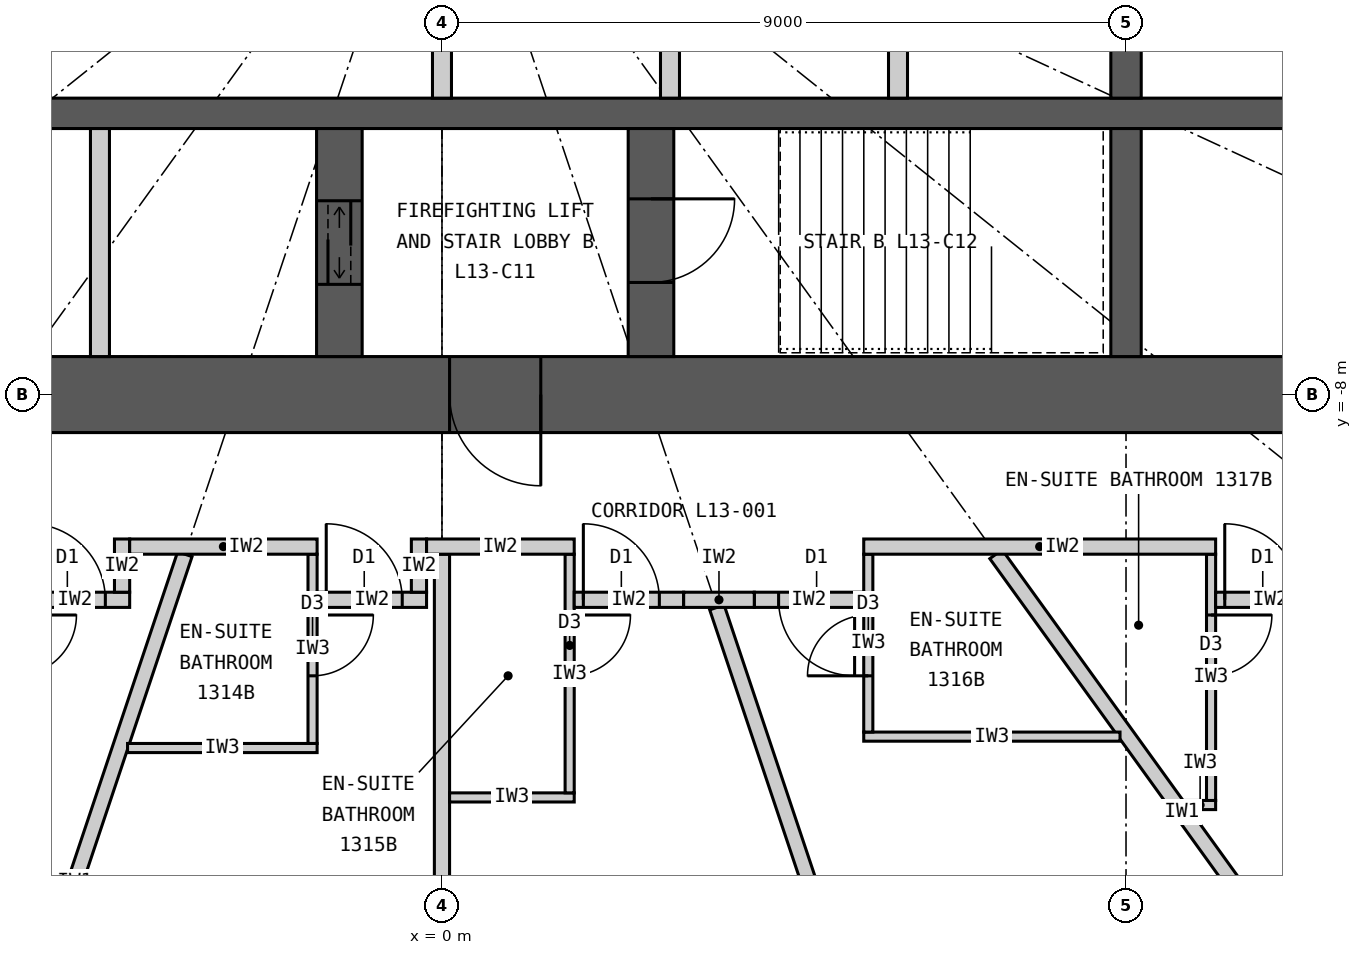
"""IFC4 building model, lengths in metres.
Left out: names, types, materials, properties, quantities, classifications, styles, units other than length and angle.
Written with IfcOpenShell. Run it as: python <this file> out.ifc"""

import sys

from ifc_helpers import new_model, si_unit, direction, frame, frame_2d, origin, place, context, subcontext, project, spatial, rectangle, extrude, element, fill, save


model = new_model("IFC4")
c1 = context("Model", 3, precision=1e-05, world=origin(), true_north=direction((0.0, 1.0)))
c2 = subcontext(c1, "Body", "Model", "MODEL_VIEW")
j1 = project(units=[si_unit("LENGTHUNIT", "METRE"), si_unit("PLANEANGLEUNIT", "RADIAN")], contexts=[c1])
p1 = place(None, origin())
s1 = spatial("IfcSite", under=j1, at=p1, CompositionType="ELEMENT")
p2 = place(p1, origin())
s2 = spatial("IfcBuilding", under=s1, at=p2, CompositionType="ELEMENT")
p3 = place(p2, frame((0.0, 0.0, 57.3)))
s3 = spatial("IfcBuildingStorey", under=s2, at=p3, CompositionType="ELEMENT", Elevation=57.3)
p4 = place(p3, frame((12.5, -8.0, 0.0), z_axis=(0.0, 0.0, 1.0), x_axis=(-1.0, 0.0, 0.0)))
e1 = element("IfcWall", 1, at=p4, inside=s3, PredefinedType="SHEAR", context=c2, shape_type="SweptSolid", body=[
    extrude(rectangle(XDim=25.0, YDim=1.0, at=frame_2d((12.5, 0.0))), origin(), (0.0, 0.0, 1.0), 3.3),
])
p5 = place(p4, frame((11.2, 0.0, 0.0)))
e2 = element("IfcOpeningElement", 2, at=p5, cuts=e1, PredefinedType="OPENING", context=c2, shape_type="SweptSolid", body=[
    extrude(rectangle(XDim=1.2, YDim=2.2, at=frame_2d((0.6, 1.1))), frame((0.0, 0.51, 0.0), z_axis=(0.0, -1.0, 0.0), x_axis=(1.0, 0.0, 0.0)), (0.0, 0.0, 1.0), 1.02),
])
p6 = place(p4, frame((18.8, 0.0, 0.0)))
e3 = element("IfcOpeningElement", 3, at=p6, cuts=e1, PredefinedType="OPENING", context=c2, shape_type="SweptSolid", body=[
    extrude(rectangle(XDim=0.9, YDim=2.2, at=frame_2d((0.45, 1.1))), frame((0.0, 0.51, 0.0), z_axis=(0.0, -1.0, 0.0), x_axis=(1.0, 0.0, 0.0)), (0.0, 0.0, 1.0), 1.02),
])
p7 = place(p3, frame((-11.5, -4.3, 0.0), z_axis=(0.0, 0.0, 1.0), x_axis=(1.0, 0.0, 0.0)))
e4 = element("IfcWall", 4, at=p7, inside=s3, PredefinedType="SHEAR", context=c2, shape_type="SweptSolid", body=[
    extrude(rectangle(XDim=23.0, YDim=0.4, at=frame_2d((11.5, 0.0))), origin(), (0.0, 0.0, 1.0), 3.3),
])
p8 = place(p3, frame((9.0, -4.1, 0.0), z_axis=(0.0, 0.0, 1.0), x_axis=(0.0, 1.0, 0.0)))
e5 = element("IfcWall", 5, at=p8, inside=s3, PredefinedType="SHEAR", context=c2, shape_type="SweptSolid", body=[
    extrude(rectangle(XDim=2.35, YDim=0.4, at=frame_2d((1.175, 0.0))), origin(), (0.0, 0.0, 1.0), 3.3),
])
p9 = place(p3, frame((9.0, -7.5, 0.0), z_axis=(0.0, 0.0, 1.0), x_axis=(0.0, 1.0, 0.0)))
e6 = element("IfcWall", 6, at=p9, inside=s3, PredefinedType="SHEAR", context=c2, shape_type="SweptSolid", body=[
    extrude(rectangle(XDim=3.0, YDim=0.4, at=frame_2d((1.5, 0.0))), origin(), (0.0, 0.0, 1.0), 3.3),
])
p10 = place(p3, frame((2.75, -7.5, 0.0), z_axis=(0.0, 0.0, 1.0), x_axis=(0.0, 1.0, 0.0)))
e7 = element("IfcWall", 7, at=p10, inside=s3, PredefinedType="SHEAR", context=c2, shape_type="SweptSolid", body=[
    extrude(rectangle(XDim=3.0, YDim=0.6, at=frame_2d((1.5, 0.0))), origin(), (0.0, 0.0, 1.0), 3.3),
])
p11 = place(p10, frame((0.975, 0.0, 0.0)))
e8 = element("IfcOpeningElement", 8, at=p11, cuts=e7, PredefinedType="OPENING", context=c2, shape_type="SweptSolid", body=[
    extrude(rectangle(XDim=1.1, YDim=2.2, at=frame_2d((0.55, 1.1))), frame((0.0, 0.31, 0.0), z_axis=(0.0, -1.0, 0.0), x_axis=(1.0, 0.0, 0.0)), (0.0, 0.0, 1.0), 0.62),
])
p12 = place(p3, frame((-1.35, -7.5, 0.0), z_axis=(0.0, 0.0, 1.0), x_axis=(0.0, 1.0, 0.0)))
e9 = element("IfcWall", 9, at=p12, inside=s3, PredefinedType="SHEAR", context=c2, shape_type="SweptSolid", body=[
    extrude(rectangle(XDim=3.0, YDim=0.6, at=frame_2d((1.5, 0.0))), origin(), (0.0, 0.0, 1.0), 3.3),
])
p13 = place(p12, frame((0.95, 0.0, 0.0)))
e10 = element("IfcOpeningElement", 10, at=p13, cuts=e9, PredefinedType="OPENING", context=c2, shape_type="SweptSolid", body=[
    extrude(rectangle(XDim=1.1, YDim=2.2, at=frame_2d((0.55, 1.1))), frame((0.0, 0.31, 0.0), z_axis=(0.0, -1.0, 0.0), x_axis=(1.0, 0.0, 0.0)), (0.0, 0.0, 1.0), 0.62),
])
p14 = place(p3, frame((-4.5, -7.5, 0.0), z_axis=(0.0, 0.0, 1.0), x_axis=(0.0, 1.0, 0.0)))
e11 = element("IfcWall", 11, at=p14, inside=s3, PredefinedType="PARTITIONING", context=c2, shape_type="SweptSolid", body=[
    extrude(rectangle(XDim=3.0, YDim=0.25, at=frame_2d((1.5, 0.0))), origin(), (0.0, 0.0, 1.0), 3.3),
])
for number, where, z_axis, x_axis in (
    (12, (0.0, -4.1, 0.0), (0.0, 0.0, 1.0), (0.0, 1.0, 0.0)),
    (13, (3.0, -4.1, 0.0), (0.0, 0.0, 1.0), (0.0, 1.0, 0.0)),
    (14, (6.0, -4.1, 0.0), (0.0, 0.0, 1.0), (0.0, 1.0, 0.0)),
):
    element("IfcWall", number, at=place(p3, frame(where, z_axis=z_axis, x_axis=x_axis)), inside=s3, PredefinedType="PARTITIONING", context=c2, shape_type="SweptSolid", body=[
        extrude(rectangle(XDim=2.35, YDim=0.25, at=frame_2d((1.175, 0.0))), origin(), (0.0, 0.0, 1.0), 3.3),
    ])
p15 = place(p3, frame((-3.383, -10.1, 0.0), z_axis=(0.0, 0.0, 1.0), x_axis=(-0.31759592231, -0.948226149256, 0.0)))
e15 = element("IfcWall", 15, at=p15, inside=s3, PredefinedType="PARTITIONING", context=c2, shape_type="SweptSolid", body=[
    extrude(rectangle(XDim=9.098, YDim=0.2, at=frame_2d((4.549, 0.0))), origin(), (0.0, 0.0, 1.0), 2.32),
])
p16 = place(p3, frame((0.0, -10.1, 0.0), z_axis=(0.0, 0.0, 1.0), x_axis=(0.0, -1.0, 0.0)))
e16 = element("IfcWall", 16, at=p16, inside=s3, PredefinedType="PARTITIONING", context=c2, shape_type="SweptSolid", body=[
    extrude(rectangle(XDim=9.25, YDim=0.2, at=frame_2d((4.625, 0.0))), origin(), (0.0, 0.0, 1.0), 2.32),
])
p17 = place(p3, frame((3.617, -10.8, 0.0), z_axis=(0.0, 0.0, 1.0), x_axis=(0.317576599239, -0.948232621046, 0.0)))
e17 = element("IfcWall", 17, at=p17, inside=s3, PredefinedType="PARTITIONING", context=c2, shape_type="SweptSolid", body=[
    extrude(rectangle(XDim=8.36, YDim=0.2, at=frame_2d((4.18, 0.0))), origin(), (0.0, 0.0, 1.0), 2.32),
])
p18 = place(p3, frame((7.289, -10.1, 0.0), z_axis=(0.0, 0.0, 1.0), x_axis=(0.585198353053, -0.810890182197, 0.0)))
e18 = element("IfcWall", 18, at=p18, inside=s3, PredefinedType="PARTITIONING", context=c2, shape_type="SweptSolid", body=[
    extrude(rectangle(XDim=8.36, YDim=0.2, at=frame_2d((4.18, 0.0))), origin(), (0.0, 0.0, 1.0), 2.32),
])
p19 = place(p3, frame((-4.137, -12.65, 0.0), z_axis=(0.0, 0.0, 1.0), x_axis=(1.0, 0.0, 0.0)))
e19 = element("IfcWall", 19, at=p19, inside=s3, PredefinedType="PARTITIONING", context=c2, shape_type="SweptSolid", body=[
    extrude(rectangle(XDim=2.494, YDim=0.12, at=frame_2d((1.247, 0.0))), origin(), (0.0, 0.0, 1.0), 3.12),
])
p20 = place(p3, frame((-1.703, -10.1, 0.0), z_axis=(0.0, 0.0, 1.0), x_axis=(0.0, -1.0, 0.0)))
e20 = element("IfcWall", 20, at=p20, inside=s3, PredefinedType="PARTITIONING", context=c2, shape_type="SweptSolid", body=[
    extrude(rectangle(XDim=2.49, YDim=0.12, at=frame_2d((1.245, 0.0))), origin(), (0.0, 0.0, 1.0), 3.12),
])
p21 = place(p20, frame((0.8, 0.0, 0.0)))
e21 = element("IfcOpeningElement", 21, at=p21, cuts=e20, PredefinedType="OPENING", context=c2, shape_type="SweptSolid", body=[
    extrude(rectangle(XDim=0.8, YDim=2.1, at=frame_2d((0.4, 1.05))), frame((0.0, 0.07, 0.0), z_axis=(0.0, -1.0, 0.0), x_axis=(1.0, 0.0, 0.0)), (0.0, 0.0, 1.0), 0.14),
])
p22 = place(p3, frame((0.1, -13.3, 0.0), z_axis=(0.0, 0.0, 1.0), x_axis=(1.0, 0.0, 0.0)))
e22 = element("IfcWall", 22, at=p22, inside=s3, PredefinedType="PARTITIONING", context=c2, shape_type="SweptSolid", body=[
    extrude(rectangle(XDim=1.64, YDim=0.12, at=frame_2d((0.82, 0.0))), origin(), (0.0, 0.0, 1.0), 3.12),
])
p23 = place(p3, frame((1.68, -10.1, 0.0), z_axis=(0.0, 0.0, 1.0), x_axis=(0.0, -1.0, 0.0)))
e23 = element("IfcWall", 23, at=p23, inside=s3, PredefinedType="PARTITIONING", context=c2, shape_type="SweptSolid", body=[
    extrude(rectangle(XDim=3.14, YDim=0.12, at=frame_2d((1.57, 0.0))), origin(), (0.0, 0.0, 1.0), 3.12),
])
p24 = place(p23, frame((0.8, 0.0, 0.0)))
e24 = element("IfcOpeningElement", 24, at=p24, cuts=e23, PredefinedType="OPENING", context=c2, shape_type="SweptSolid", body=[
    extrude(rectangle(XDim=0.8, YDim=2.1, at=frame_2d((0.4, 1.05))), frame((0.0, 0.07, 0.0), z_axis=(0.0, -1.0, 0.0), x_axis=(1.0, 0.0, 0.0)), (0.0, 0.0, 1.0), 0.14),
])
p25 = place(p3, frame((8.921, -12.5, 0.0), z_axis=(0.0, 0.0, 1.0), x_axis=(-1.0, 0.0, 0.0)))
e25 = element("IfcWall", 25, at=p25, inside=s3, PredefinedType="PARTITIONING", context=c2, shape_type="SweptSolid", body=[
    extrude(rectangle(XDim=3.372, YDim=0.12, at=frame_2d((1.686, 0.0))), origin(), (0.0, 0.0, 1.0), 3.12),
])
p26 = place(p3, frame((5.609, -10.1, 0.0), z_axis=(0.0, 0.0, 1.0), x_axis=(0.0, -1.0, 0.0)))
e26 = element("IfcWall", 26, at=p26, inside=s3, PredefinedType="PARTITIONING", context=c2, shape_type="SweptSolid", body=[
    extrude(rectangle(XDim=2.34, YDim=0.12, at=frame_2d((1.17, 0.0))), origin(), (0.0, 0.0, 1.0), 3.12),
])
p27 = place(p26, frame((0.8, 0.0, 0.0)))
e27 = element("IfcOpeningElement", 27, at=p27, cuts=e26, PredefinedType="OPENING", context=c2, shape_type="SweptSolid", body=[
    extrude(rectangle(XDim=0.8, YDim=2.1, at=frame_2d((0.4, 1.05))), frame((0.0, 0.07, 0.0), z_axis=(0.0, -1.0, 0.0), x_axis=(1.0, 0.0, 0.0)), (0.0, 0.0, 1.0), 0.14),
])
p28 = place(p3, frame((9.771, -13.4, 0.0), z_axis=(0.0, 0.0, 1.0), x_axis=(1.0, 0.0, 0.0)))
e28 = element("IfcWall", 28, at=p28, inside=s3, PredefinedType="PARTITIONING", context=c2, shape_type="SweptSolid", body=[
    extrude(rectangle(XDim=0.408, YDim=0.12, at=frame_2d((0.204, 0.0))), origin(), (0.0, 0.0, 1.0), 3.12),
])
p29 = place(p3, frame((10.119, -10.1, 0.0), z_axis=(0.0, 0.0, 1.0), x_axis=(0.0, -1.0, 0.0)))
e29 = element("IfcWall", 29, at=p29, inside=s3, PredefinedType="PARTITIONING", context=c2, shape_type="SweptSolid", body=[
    extrude(rectangle(XDim=3.24, YDim=0.12, at=frame_2d((1.62, 0.0))), origin(), (0.0, 0.0, 1.0), 3.12),
])
p30 = place(p29, frame((0.8, 0.0, 0.0)))
e30 = element("IfcOpeningElement", 30, at=p30, cuts=e29, PredefinedType="OPENING", context=c2, shape_type="SweptSolid", body=[
    extrude(rectangle(XDim=0.8, YDim=2.1, at=frame_2d((0.4, 1.05))), frame((0.0, 0.07, 0.0), z_axis=(0.0, -1.0, 0.0), x_axis=(1.0, 0.0, 0.0)), (0.0, 0.0, 1.0), 0.14),
])
p31 = place(p3, frame((-4.109, -10.7, 0.0), z_axis=(0.0, 0.0, 1.0), x_axis=(-1.0, 0.0, 0.0)))
e31 = element("IfcWall", 31, at=p31, inside=s3, PredefinedType="PARTITIONING", context=c2, shape_type="SweptSolid", body=[
    extrude(rectangle(XDim=1.44, YDim=0.2, at=frame_2d((0.72, 0.0))), origin(), (0.0, 0.0, 1.0), 3.12),
])
p32 = place(p31, frame((0.32, 0.0, 0.0)))
e32 = element("IfcOpeningElement", 32, at=p32, cuts=e31, PredefinedType="OPENING", context=c2, shape_type="SweptSolid", body=[
    extrude(rectangle(XDim=1.0, YDim=2.2, at=frame_2d((0.5, 1.1))), frame((0.0, 0.11, 0.0), z_axis=(0.0, -1.0, 0.0), x_axis=(1.0, 0.0, 0.0)), (0.0, 0.0, 1.0), 0.22),
])
p33 = place(p3, frame((-4.209, -9.9, 0.0), z_axis=(0.0, 0.0, 1.0), x_axis=(0.0, -1.0, 0.0)))
e33 = element("IfcWall", 33, at=p33, inside=s3, PredefinedType="PARTITIONING", context=c2, shape_type="SweptSolid", body=[
    extrude(rectangle(XDim=0.7, YDim=0.2, at=frame_2d((0.35, 0.0))), origin(), (0.0, 0.0, 1.0), 3.12),
])
p34 = place(p3, frame((-0.203, -10.7, 0.0), z_axis=(0.0, 0.0, 1.0), x_axis=(-1.0, 0.0, 0.0)))
e34 = element("IfcWall", 34, at=p34, inside=s3, PredefinedType="PARTITIONING", context=c2, shape_type="SweptSolid", body=[
    extrude(rectangle(XDim=1.44, YDim=0.2, at=frame_2d((0.72, 0.0))), origin(), (0.0, 0.0, 1.0), 3.12),
])
p35 = place(p34, frame((0.32, 0.0, 0.0)))
e35 = element("IfcOpeningElement", 35, at=p35, cuts=e34, PredefinedType="OPENING", context=c2, shape_type="SweptSolid", body=[
    extrude(rectangle(XDim=1.0, YDim=2.2, at=frame_2d((0.5, 1.1))), frame((0.0, 0.11, 0.0), z_axis=(0.0, -1.0, 0.0), x_axis=(1.0, 0.0, 0.0)), (0.0, 0.0, 1.0), 0.22),
])
p36 = place(p3, frame((-0.303, -9.9, 0.0), z_axis=(0.0, 0.0, 1.0), x_axis=(0.0, -1.0, 0.0)))
e36 = element("IfcWall", 36, at=p36, inside=s3, PredefinedType="PARTITIONING", context=c2, shape_type="SweptSolid", body=[
    extrude(rectangle(XDim=0.7, YDim=0.2, at=frame_2d((0.35, 0.0))), origin(), (0.0, 0.0, 1.0), 3.12),
])
p37 = place(p3, frame((3.18, -10.7, 0.0), z_axis=(0.0, 0.0, 1.0), x_axis=(-1.0, 0.0, 0.0)))
e37 = element("IfcWall", 37, at=p37, inside=s3, PredefinedType="PARTITIONING", context=c2, shape_type="SweptSolid", body=[
    extrude(rectangle(XDim=1.44, YDim=0.2, at=frame_2d((0.72, 0.0))), origin(), (0.0, 0.0, 1.0), 3.12),
])
p38 = place(p37, frame((0.32, 0.0, 0.0)))
e38 = element("IfcOpeningElement", 38, at=p38, cuts=e37, PredefinedType="OPENING", context=c2, shape_type="SweptSolid", body=[
    extrude(rectangle(XDim=1.0, YDim=2.2, at=frame_2d((0.5, 1.1))), frame((0.0, 0.11, 0.0), z_axis=(0.0, -1.0, 0.0), x_axis=(1.0, 0.0, 0.0)), (0.0, 0.0, 1.0), 0.22),
])
p39 = place(p3, frame((5.549, -10.7, 0.0), z_axis=(0.0, 0.0, 1.0), x_axis=(-1.0, 0.0, 0.0)))
e39 = element("IfcWall", 39, at=p39, inside=s3, PredefinedType="PARTITIONING", context=c2, shape_type="SweptSolid", body=[
    extrude(rectangle(XDim=1.44, YDim=0.2, at=frame_2d((0.72, 0.0))), origin(), (0.0, 0.0, 1.0), 3.12),
])
p40 = place(p39, frame((0.12, 0.0, 0.0)))
e40 = element("IfcOpeningElement", 40, at=p40, cuts=e39, PredefinedType="OPENING", context=c2, shape_type="SweptSolid", body=[
    extrude(rectangle(XDim=1.0, YDim=2.2, at=frame_2d((0.5, 1.1))), frame((0.0, 0.11, 0.0), z_axis=(0.0, -1.0, 0.0), x_axis=(1.0, 0.0, 0.0)), (0.0, 0.0, 1.0), 0.22),
])
p41 = place(p3, frame((11.619, -10.7, 0.0), z_axis=(0.0, 0.0, 1.0), x_axis=(-1.0, 0.0, 0.0)))
e41 = element("IfcWall", 41, at=p41, inside=s3, PredefinedType="PARTITIONING", context=c2, shape_type="SweptSolid", body=[
    extrude(rectangle(XDim=1.44, YDim=0.2, at=frame_2d((0.72, 0.0))), origin(), (0.0, 0.0, 1.0), 3.12),
])
p42 = place(p41, frame((0.32, 0.0, 0.0)))
e42 = element("IfcOpeningElement", 42, at=p42, cuts=e41, PredefinedType="OPENING", context=c2, shape_type="SweptSolid", body=[
    extrude(rectangle(XDim=1.0, YDim=2.2, at=frame_2d((0.5, 1.1))), frame((0.0, 0.11, 0.0), z_axis=(0.0, -1.0, 0.0), x_axis=(1.0, 0.0, 0.0)), (0.0, 0.0, 1.0), 0.22),
])
p43 = place(p3, frame((4.109, -10.7, 0.0), z_axis=(0.0, 0.0, 1.0), x_axis=(-1.0, 0.0, 0.0)))
e43 = element("IfcWall", 43, at=p43, inside=s3, PredefinedType="PARTITIONING", context=c2, shape_type="SweptSolid", body=[
    extrude(rectangle(XDim=0.929, YDim=0.2, at=frame_2d((0.465, 0.0))), origin(), (0.0, 0.0, 1.0), 3.12),
])
p44 = place(p3, frame((10.179, -10.0, 0.0), z_axis=(0.0, 0.0, 1.0), x_axis=(-1.0, 0.0, 0.0)))
e44 = element("IfcWall", 44, at=p44, inside=s3, PredefinedType="PARTITIONING", context=c2, shape_type="SweptSolid", body=[
    extrude(rectangle(XDim=4.63, YDim=0.2, at=frame_2d((2.315, 0.0))), origin(), (0.0, 0.0, 1.0), 3.12),
])
p45 = place(p3, frame((1.74, -10.0, 0.0), z_axis=(0.0, 0.0, 1.0), x_axis=(-1.0, 0.0, 0.0)))
e45 = element("IfcWall", 45, at=p45, inside=s3, PredefinedType="PARTITIONING", context=c2, shape_type="SweptSolid", body=[
    extrude(rectangle(XDim=1.943, YDim=0.2, at=frame_2d((0.971, 0.0))), origin(), (0.0, 0.0, 1.0), 3.12),
])
p46 = place(p3, frame((-1.643, -10.0, 0.0), z_axis=(0.0, 0.0, 1.0), x_axis=(-1.0, 0.0, 0.0)))
e46 = element("IfcWall", 46, at=p46, inside=s3, PredefinedType="PARTITIONING", context=c2, shape_type="SweptSolid", body=[
    extrude(rectangle(XDim=2.466, YDim=0.2, at=frame_2d((1.233, 0.0))), origin(), (0.0, 0.0, 1.0), 3.12),
])
p47 = place(p32, origin())
e47 = element("IfcDoor", 47, at=p47, inside=s3, OperationType="SINGLE_SWING_RIGHT", PredefinedType="DOOR", context=c2, shape_type="SweptSolid", body=[
    extrude(rectangle(XDim=1.0, YDim=2.2, at=frame_2d((0.5, 1.1))), frame((0.0, 0.025, 0.0), z_axis=(0.0, -1.0, 0.0), x_axis=(1.0, 0.0, 0.0)), (0.0, 0.0, 1.0), 0.05),
])
fill(e32, e47)
p48 = place(p21, origin())
e48 = element("IfcDoor", 48, at=p48, inside=s3, OperationType="SINGLE_SWING_LEFT", PredefinedType="DOOR", context=c2, shape_type="SweptSolid", body=[
    extrude(rectangle(XDim=0.8, YDim=2.1, at=frame_2d((0.4, 1.05))), frame((0.0, 0.025, 0.0), z_axis=(0.0, -1.0, 0.0), x_axis=(1.0, 0.0, 0.0)), (0.0, 0.0, 1.0), 0.05),
])
fill(e21, e48)
p49 = place(p35, origin())
e49 = element("IfcDoor", 49, at=p49, inside=s3, OperationType="SINGLE_SWING_RIGHT", PredefinedType="DOOR", context=c2, shape_type="SweptSolid", body=[
    extrude(rectangle(XDim=1.0, YDim=2.2, at=frame_2d((0.5, 1.1))), frame((0.0, 0.025, 0.0), z_axis=(0.0, -1.0, 0.0), x_axis=(1.0, 0.0, 0.0)), (0.0, 0.0, 1.0), 0.05),
])
fill(e35, e49)
p50 = place(p24, origin())
e50 = element("IfcDoor", 50, at=p50, inside=s3, OperationType="SINGLE_SWING_LEFT", PredefinedType="DOOR", context=c2, shape_type="SweptSolid", body=[
    extrude(rectangle(XDim=0.8, YDim=2.1, at=frame_2d((0.4, 1.05))), frame((0.0, 0.025, 0.0), z_axis=(0.0, -1.0, 0.0), x_axis=(1.0, 0.0, 0.0)), (0.0, 0.0, 1.0), 0.05),
])
fill(e24, e50)
p51 = place(p38, origin())
e51 = element("IfcDoor", 51, at=p51, inside=s3, OperationType="SINGLE_SWING_RIGHT", PredefinedType="DOOR", context=c2, shape_type="SweptSolid", body=[
    extrude(rectangle(XDim=1.0, YDim=2.2, at=frame_2d((0.5, 1.1))), frame((0.0, 0.025, 0.0), z_axis=(0.0, -1.0, 0.0), x_axis=(1.0, 0.0, 0.0)), (0.0, 0.0, 1.0), 0.05),
])
fill(e38, e51)
p52 = place(p27, origin())
e52 = element("IfcDoor", 52, at=p52, inside=s3, OperationType="SINGLE_SWING_RIGHT", PredefinedType="DOOR", context=c2, shape_type="SweptSolid", body=[
    extrude(rectangle(XDim=0.8, YDim=2.1, at=frame_2d((0.4, 1.05))), frame((0.0, 0.025, 0.0), z_axis=(0.0, -1.0, 0.0), x_axis=(1.0, 0.0, 0.0)), (0.0, 0.0, 1.0), 0.05),
])
fill(e27, e52)
p53 = place(p40, origin())
e53 = element("IfcDoor", 53, at=p53, inside=s3, OperationType="SINGLE_SWING_LEFT", PredefinedType="DOOR", context=c2, shape_type="SweptSolid", body=[
    extrude(rectangle(XDim=1.0, YDim=2.2, at=frame_2d((0.5, 1.1))), frame((0.0, 0.025, 0.0), z_axis=(0.0, -1.0, 0.0), x_axis=(1.0, 0.0, 0.0)), (0.0, 0.0, 1.0), 0.05),
])
fill(e40, e53)
p54 = place(p30, origin())
e54 = element("IfcDoor", 54, at=p54, inside=s3, OperationType="SINGLE_SWING_LEFT", PredefinedType="DOOR", context=c2, shape_type="SweptSolid", body=[
    extrude(rectangle(XDim=0.8, YDim=2.1, at=frame_2d((0.4, 1.05))), frame((0.0, 0.025, 0.0), z_axis=(0.0, -1.0, 0.0), x_axis=(1.0, 0.0, 0.0)), (0.0, 0.0, 1.0), 0.05),
])
fill(e30, e54)
p55 = place(p42, origin())
e55 = element("IfcDoor", 55, at=p55, inside=s3, OperationType="SINGLE_SWING_RIGHT", PredefinedType="DOOR", context=c2, shape_type="SweptSolid", body=[
    extrude(rectangle(XDim=1.0, YDim=2.2, at=frame_2d((0.5, 1.1))), frame((0.0, 0.025, 0.0), z_axis=(0.0, -1.0, 0.0), x_axis=(1.0, 0.0, 0.0)), (0.0, 0.0, 1.0), 0.05),
])
fill(e42, e55)
p56 = place(p5, origin())
e56 = element("IfcDoor", 56, at=p56, inside=s3, OperationType="SINGLE_SWING_LEFT", PredefinedType="DOOR", context=c2, shape_type="SweptSolid", body=[
    extrude(rectangle(XDim=1.2, YDim=2.2, at=frame_2d((0.6, 1.1))), frame((0.0, 0.025, 0.0), z_axis=(0.0, -1.0, 0.0), x_axis=(1.0, 0.0, 0.0)), (0.0, 0.0, 1.0), 0.05),
])
fill(e2, e56)
p57 = place(p11, origin())
e57 = element("IfcDoor", 57, at=p57, inside=s3, OperationType="SINGLE_SWING_RIGHT", PredefinedType="DOOR", context=c2, shape_type="SweptSolid", body=[
    extrude(rectangle(XDim=1.1, YDim=2.2, at=frame_2d((0.55, 1.1))), frame((0.0, 0.025, 0.0), z_axis=(0.0, -1.0, 0.0), x_axis=(1.0, 0.0, 0.0)), (0.0, 0.0, 1.0), 0.05),
])
fill(e8, e57)
p58 = place(p13, origin())
e58 = element("IfcDoor", 58, at=p58, inside=s3, OperationType="DOUBLE_DOOR_SLIDING", PredefinedType="DOOR", context=c2, shape_type="SweptSolid", body=[
    extrude(rectangle(XDim=1.1, YDim=2.2, at=frame_2d((0.55, 1.1))), frame((0.0, 0.025, 0.0), z_axis=(0.0, -1.0, 0.0), x_axis=(1.0, 0.0, 0.0)), (0.0, 0.0, 1.0), 0.05),
])
fill(e10, e58)
save(model, sys.argv[1])
